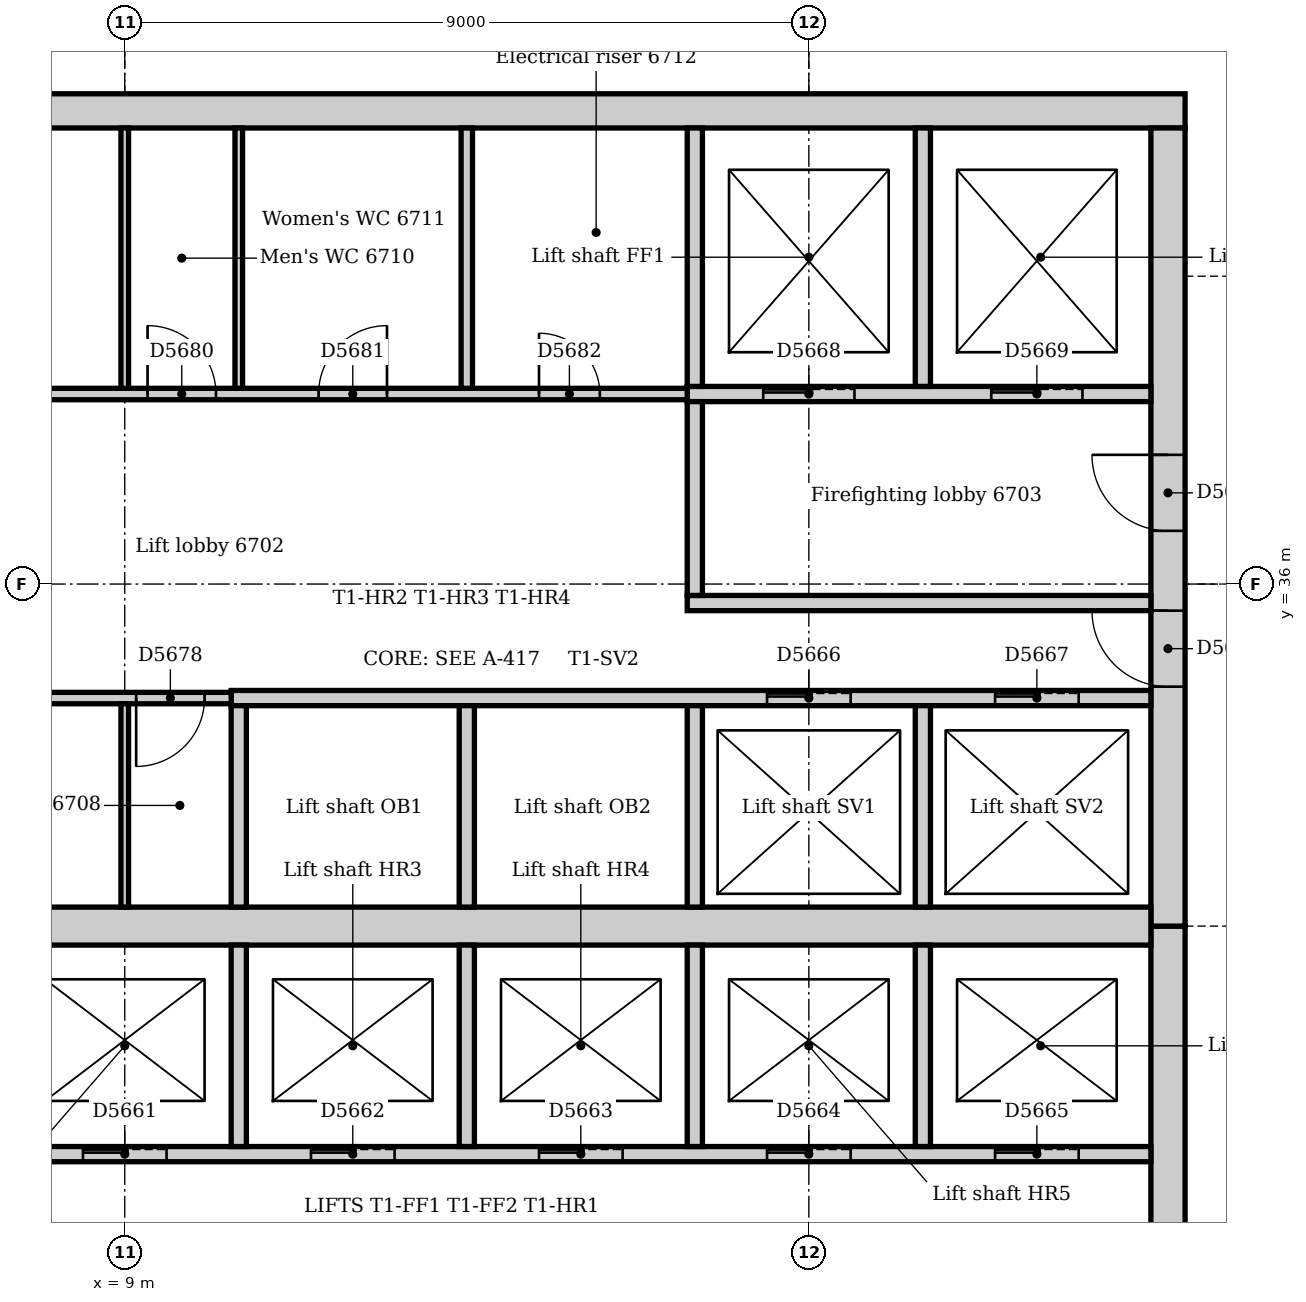
"""IFC4 building model, lengths in metres.
Left out: names, types, materials, properties, quantities, classifications, styles, units other than length and angle.
Written with IfcOpenShell. Run it as: python <this file> out.ifc"""

import sys

from ifc_helpers import new_model, si_unit, direction, frame, frame_2d, origin, place, context, subcontext, project, spatial, rectangle, extrude, element, fill, save


model = new_model("IFC4")
c1 = context("Model", 3, precision=1e-05, world=origin(), true_north=direction((0.0, 1.0)))
c2 = subcontext(c1, "Body", "Model", "MODEL_VIEW")
j1 = project(units=[si_unit("LENGTHUNIT", "METRE"), si_unit("PLANEANGLEUNIT", "RADIAN")], contexts=[c1])
p1 = place(None, origin())
s1 = spatial("IfcSite", under=j1, at=p1, CompositionType="ELEMENT")
p2 = place(p1, origin())
s2 = spatial("IfcBuilding", under=s1, at=p2, CompositionType="ELEMENT")
p3 = place(p2, frame((0.0, 0.0, 279.0)))
s3 = spatial("IfcBuildingStorey", under=s2, at=p3, CompositionType="ELEMENT", Elevation=279.0)
p4 = place(p3, frame((22.95, 42.225, 0.0), z_axis=(0.0, 0.0, 1.0), x_axis=(-1.0, 0.0, 0.0)))
e1 = element("IfcWall", 1, at=p4, inside=s3, PredefinedType="SOLIDWALL", context=c2, shape_type="SweptSolid", body=[
    extrude(rectangle(XDim=18.9, YDim=0.45, at=frame_2d((9.45, 0.0))), origin(), (0.0, 0.0, 1.0), 4.0),
])
p5 = place(p3, frame((22.725, 21.0, 0.0), z_axis=(0.0, 0.0, 1.0), x_axis=(0.0, 1.0, 0.0)))
e2 = element("IfcWall", 2, at=p5, inside=s3, PredefinedType="SOLIDWALL", context=c2, shape_type="SweptSolid", body=[
    extrude(rectangle(XDim=10.5, YDim=0.45, at=frame_2d((5.25, 0.0))), origin(), (0.0, 0.0, 1.0), 4.0),
])
p6 = place(p5, frame((4.35, 0.0, 0.0)))
e3 = element("IfcOpeningElement", 3, at=p6, cuts=e2, PredefinedType="OPENING", context=c2, shape_type="SweptSolid", body=[
    extrude(rectangle(XDim=1.8, YDim=2.1, at=frame_2d((0.9, 1.05))), frame((0.0, 0.235, 0.0), z_axis=(0.0, -1.0, 0.0), x_axis=(1.0, 0.0, 0.0)), (0.0, 0.0, 1.0), 0.47),
])
p7 = place(p3, frame((22.725, 31.5, 0.0), z_axis=(0.0, 0.0, 1.0), x_axis=(0.0, 1.0, 0.0)))
e4 = element("IfcWall", 4, at=p7, inside=s3, PredefinedType="SOLIDWALL", context=c2, shape_type="SweptSolid", body=[
    extrude(rectangle(XDim=10.5, YDim=0.45, at=frame_2d((5.25, 0.0))), origin(), (0.0, 0.0, 1.0), 4.0),
])
p8 = place(p7, frame((3.15, 0.0, 0.0)))
e5 = element("IfcOpeningElement", 5, at=p8, cuts=e4, PredefinedType="OPENING", context=c2, shape_type="SweptSolid", body=[
    extrude(rectangle(XDim=1.0, YDim=2.1, at=frame_2d((0.5, 1.05))), frame((0.0, 0.235, 0.0), z_axis=(0.0, -1.0, 0.0), x_axis=(1.0, 0.0, 0.0)), (0.0, 0.0, 1.0), 0.47),
])
p9 = place(p7, frame((5.2, 0.0, 0.0)))
e6 = element("IfcOpeningElement", 6, at=p9, cuts=e4, PredefinedType="OPENING", context=c2, shape_type="SweptSolid", body=[
    extrude(rectangle(XDim=1.0, YDim=2.1, at=frame_2d((0.5, 1.05))), frame((0.0, 0.235, 0.0), z_axis=(0.0, -1.0, 0.0), x_axis=(1.0, 0.0, 0.0)), (0.0, 0.0, 1.0), 0.47),
])
p10 = place(p3, frame((4.5, 31.5, 0.0), z_axis=(0.0, 0.0, 1.0), x_axis=(1.0, 0.0, 0.0)))
e7 = element("IfcWall", 7, at=p10, inside=s3, PredefinedType="SOLIDWALL", context=c2, shape_type="SweptSolid", body=[
    extrude(rectangle(XDim=18.0, YDim=0.5, at=frame_2d((9.0, 0.0))), origin(), (0.0, 0.0, 1.0), 4.0),
])
p11 = place(p3, frame((16.4, 35.75, 0.0), z_axis=(0.0, 0.0, 1.0), x_axis=(1.0, 0.0, 0.0)))
e8 = element("IfcWall", 8, at=p11, inside=s3, PredefinedType="PARTITIONING", context=c2, shape_type="SweptSolid", body=[
    extrude(rectangle(XDim=6.1, YDim=0.2, at=frame_2d((3.05, 0.0))), origin(), (0.0, 0.0, 1.0), 3.8),
])
p12 = place(p3, frame((16.4, 38.5, 0.0), z_axis=(0.0, 0.0, 1.0), x_axis=(1.0, 0.0, 0.0)))
e9 = element("IfcWall", 9, at=p12, inside=s3, PredefinedType="PARTITIONING", context=c2, shape_type="SweptSolid", body=[
    extrude(rectangle(XDim=6.1, YDim=0.2, at=frame_2d((3.05, 0.0))), origin(), (0.0, 0.0, 1.0), 3.8),
])
p13 = place(p12, frame((1.0, 0.0, 0.0)))
e10 = element("IfcOpeningElement", 10, at=p13, cuts=e9, PredefinedType="OPENING", context=c2, shape_type="SweptSolid", body=[
    extrude(rectangle(XDim=1.2, YDim=2.1, at=frame_2d((0.6, 1.05))), frame((0.0, 0.11, 0.0), z_axis=(0.0, -1.0, 0.0), x_axis=(1.0, 0.0, 0.0)), (0.0, 0.0, 1.0), 0.22),
])
p14 = place(p12, frame((4.0, 0.0, 0.0)))
e11 = element("IfcOpeningElement", 11, at=p14, cuts=e9, PredefinedType="OPENING", context=c2, shape_type="SweptSolid", body=[
    extrude(rectangle(XDim=1.2, YDim=2.1, at=frame_2d((0.6, 1.05))), frame((0.0, 0.11, 0.0), z_axis=(0.0, -1.0, 0.0), x_axis=(1.0, 0.0, 0.0)), (0.0, 0.0, 1.0), 0.22),
])
p15 = place(p3, frame((16.5, 35.85, 0.0), z_axis=(0.0, 0.0, 1.0), x_axis=(0.0, 1.0, 0.0)))
e12 = element("IfcWall", 12, at=p15, inside=s3, PredefinedType="PARTITIONING", context=c2, shape_type="SweptSolid", body=[
    extrude(rectangle(XDim=2.55, YDim=0.2, at=frame_2d((1.275, 0.0))), origin(), (0.0, 0.0, 1.0), 3.8),
])
p16 = place(p3, frame((4.5, 28.5, 0.0), z_axis=(0.0, 0.0, 1.0), x_axis=(1.0, 0.0, 0.0)))
e13 = element("IfcWall", 13, at=p16, inside=s3, PredefinedType="PARTITIONING", context=c2, shape_type="SweptSolid", body=[
    extrude(rectangle(XDim=18.0, YDim=0.2, at=frame_2d((9.0, 0.0))), origin(), (0.0, 0.0, 1.0), 3.8),
])
p17 = place(p16, frame((0.95, 0.0, 0.0)))
e14 = element("IfcOpeningElement", 14, at=p17, cuts=e13, PredefinedType="OPENING", context=c2, shape_type="SweptSolid", body=[
    extrude(rectangle(XDim=1.1, YDim=2.1, at=frame_2d((0.55, 1.05))), frame((0.0, 0.11, 0.0), z_axis=(0.0, -1.0, 0.0), x_axis=(1.0, 0.0, 0.0)), (0.0, 0.0, 1.0), 0.22),
])
p18 = place(p16, frame((3.95, 0.0, 0.0)))
e15 = element("IfcOpeningElement", 15, at=p18, cuts=e13, PredefinedType="OPENING", context=c2, shape_type="SweptSolid", body=[
    extrude(rectangle(XDim=1.1, YDim=2.1, at=frame_2d((0.55, 1.05))), frame((0.0, 0.11, 0.0), z_axis=(0.0, -1.0, 0.0), x_axis=(1.0, 0.0, 0.0)), (0.0, 0.0, 1.0), 0.22),
])
p19 = place(p16, frame((6.95, 0.0, 0.0)))
e16 = element("IfcOpeningElement", 16, at=p19, cuts=e13, PredefinedType="OPENING", context=c2, shape_type="SweptSolid", body=[
    extrude(rectangle(XDim=1.1, YDim=2.1, at=frame_2d((0.55, 1.05))), frame((0.0, 0.11, 0.0), z_axis=(0.0, -1.0, 0.0), x_axis=(1.0, 0.0, 0.0)), (0.0, 0.0, 1.0), 0.22),
])
p20 = place(p16, frame((9.95, 0.0, 0.0)))
e17 = element("IfcOpeningElement", 17, at=p20, cuts=e13, PredefinedType="OPENING", context=c2, shape_type="SweptSolid", body=[
    extrude(rectangle(XDim=1.1, YDim=2.1, at=frame_2d((0.55, 1.05))), frame((0.0, 0.11, 0.0), z_axis=(0.0, -1.0, 0.0), x_axis=(1.0, 0.0, 0.0)), (0.0, 0.0, 1.0), 0.22),
])
p21 = place(p16, frame((12.95, 0.0, 0.0)))
e18 = element("IfcOpeningElement", 18, at=p21, cuts=e13, PredefinedType="OPENING", context=c2, shape_type="SweptSolid", body=[
    extrude(rectangle(XDim=1.1, YDim=2.1, at=frame_2d((0.55, 1.05))), frame((0.0, 0.11, 0.0), z_axis=(0.0, -1.0, 0.0), x_axis=(1.0, 0.0, 0.0)), (0.0, 0.0, 1.0), 0.22),
])
p22 = place(p16, frame((15.95, 0.0, 0.0)))
e19 = element("IfcOpeningElement", 19, at=p22, cuts=e13, PredefinedType="OPENING", context=c2, shape_type="SweptSolid", body=[
    extrude(rectangle(XDim=1.1, YDim=2.1, at=frame_2d((0.55, 1.05))), frame((0.0, 0.11, 0.0), z_axis=(0.0, -1.0, 0.0), x_axis=(1.0, 0.0, 0.0)), (0.0, 0.0, 1.0), 0.22),
])
p23 = place(p3, frame((10.4, 34.5, 0.0), z_axis=(0.0, 0.0, 1.0), x_axis=(1.0, 0.0, 0.0)))
e20 = element("IfcWall", 20, at=p23, inside=s3, PredefinedType="PARTITIONING", context=c2, shape_type="SweptSolid", body=[
    extrude(rectangle(XDim=12.1, YDim=0.2, at=frame_2d((6.05, 0.0))), origin(), (0.0, 0.0, 1.0), 3.8),
])
p24 = place(p23, frame((7.05, 0.0, 0.0)))
e21 = element("IfcOpeningElement", 21, at=p24, cuts=e20, PredefinedType="OPENING", context=c2, shape_type="SweptSolid", body=[
    extrude(rectangle(XDim=1.1, YDim=2.1, at=frame_2d((0.55, 1.05))), frame((0.0, 0.11, 0.0), z_axis=(0.0, -1.0, 0.0), x_axis=(1.0, 0.0, 0.0)), (0.0, 0.0, 1.0), 0.22),
])
p25 = place(p23, frame((10.05, 0.0, 0.0)))
e22 = element("IfcOpeningElement", 22, at=p25, cuts=e20, PredefinedType="OPENING", context=c2, shape_type="SweptSolid", body=[
    extrude(rectangle(XDim=1.1, YDim=2.1, at=frame_2d((0.55, 1.05))), frame((0.0, 0.11, 0.0), z_axis=(0.0, -1.0, 0.0), x_axis=(1.0, 0.0, 0.0)), (0.0, 0.0, 1.0), 0.22),
])
for number, where, z_axis, x_axis in (
    (23, (10.5, 28.6, 0.0), (0.0, 0.0, 1.0), (0.0, 1.0, 0.0)),
    (24, (10.5, 31.75, 0.0), (0.0, 0.0, 1.0), (0.0, 1.0, 0.0)),
    (25, (13.5, 28.6, 0.0), (0.0, 0.0, 1.0), (0.0, 1.0, 0.0)),
    (26, (13.5, 31.75, 0.0), (0.0, 0.0, 1.0), (0.0, 1.0, 0.0)),
    (27, (16.5, 28.6, 0.0), (0.0, 0.0, 1.0), (0.0, 1.0, 0.0)),
    (28, (16.5, 31.75, 0.0), (0.0, 0.0, 1.0), (0.0, 1.0, 0.0)),
    (29, (19.5, 28.6, 0.0), (0.0, 0.0, 1.0), (0.0, 1.0, 0.0)),
    (30, (19.5, 31.75, 0.0), (0.0, 0.0, 1.0), (0.0, 1.0, 0.0)),
):
    element("IfcWall", number, at=place(p3, frame(where, z_axis=z_axis, x_axis=x_axis)), inside=s3, PredefinedType="PARTITIONING", context=c2, shape_type="SweptSolid", body=[
        extrude(rectangle(XDim=2.65, YDim=0.2, at=frame_2d((1.325, 0.0))), origin(), (0.0, 0.0, 1.0), 3.8),
    ])
for number, where, z_axis, x_axis in (
    (31, (16.5, 38.6, 0.0), (0.0, 0.0, 1.0), (0.0, 1.0, 0.0)),
    (32, (19.5, 38.6, 0.0), (0.0, 0.0, 1.0), (0.0, 1.0, 0.0)),
):
    element("IfcWall", number, at=place(p3, frame(where, z_axis=z_axis, x_axis=x_axis)), inside=s3, PredefinedType="PARTITIONING", context=c2, shape_type="SweptSolid", body=[
        extrude(rectangle(XDim=3.4, YDim=0.2, at=frame_2d((1.7, 0.0))), origin(), (0.0, 0.0, 1.0), 3.8),
    ])
p26 = place(p3, frame((4.5, 38.5, 0.0), z_axis=(0.0, 0.0, 1.0), x_axis=(1.0, 0.0, 0.0)))
e33 = element("IfcWall", 33, at=p26, inside=s3, PredefinedType="PARTITIONING", context=c2, shape_type="SweptSolid", body=[
    extrude(rectangle(XDim=11.9, YDim=0.15, at=frame_2d((5.95, 0.0))), origin(), (0.0, 0.0, 1.0), 3.8),
])
p27 = place(p26, frame((1.85, 0.0, 0.0)))
e34 = element("IfcOpeningElement", 34, at=p27, cuts=e33, PredefinedType="OPENING", context=c2, shape_type="SweptSolid", body=[
    extrude(rectangle(XDim=0.9, YDim=2.1, at=frame_2d((0.45, 1.05))), frame((0.0, 0.085, 0.0), z_axis=(0.0, -1.0, 0.0), x_axis=(1.0, 0.0, 0.0)), (0.0, 0.0, 1.0), 0.17),
])
p28 = place(p26, frame((4.8, 0.0, 0.0)))
e35 = element("IfcOpeningElement", 35, at=p28, cuts=e33, PredefinedType="OPENING", context=c2, shape_type="SweptSolid", body=[
    extrude(rectangle(XDim=0.9, YDim=2.1, at=frame_2d((0.45, 1.05))), frame((0.0, 0.085, 0.0), z_axis=(0.0, -1.0, 0.0), x_axis=(1.0, 0.0, 0.0)), (0.0, 0.0, 1.0), 0.17),
])
p29 = place(p26, frame((7.05, 0.0, 0.0)))
e36 = element("IfcOpeningElement", 36, at=p29, cuts=e33, PredefinedType="OPENING", context=c2, shape_type="SweptSolid", body=[
    extrude(rectangle(XDim=0.9, YDim=2.1, at=frame_2d((0.45, 1.05))), frame((0.0, 0.085, 0.0), z_axis=(0.0, -1.0, 0.0), x_axis=(1.0, 0.0, 0.0)), (0.0, 0.0, 1.0), 0.17),
])
p30 = place(p26, frame((9.95, 0.0, 0.0)))
e37 = element("IfcOpeningElement", 37, at=p30, cuts=e33, PredefinedType="OPENING", context=c2, shape_type="SweptSolid", body=[
    extrude(rectangle(XDim=0.8, YDim=2.1, at=frame_2d((0.4, 1.05))), frame((0.0, 0.085, 0.0), z_axis=(0.0, -1.0, 0.0), x_axis=(1.0, 0.0, 0.0)), (0.0, 0.0, 1.0), 0.17),
])
p31 = place(p3, frame((4.5, 34.5, 0.0), z_axis=(0.0, 0.0, 1.0), x_axis=(1.0, 0.0, 0.0)))
e38 = element("IfcWall", 38, at=p31, inside=s3, PredefinedType="PARTITIONING", context=c2, shape_type="SweptSolid", body=[
    extrude(rectangle(XDim=5.9, YDim=0.15, at=frame_2d((2.95, 0.0))), origin(), (0.0, 0.0, 1.0), 3.8),
])
p32 = place(p31, frame((1.85, 0.0, 0.0)))
e39 = element("IfcOpeningElement", 39, at=p32, cuts=e38, PredefinedType="OPENING", context=c2, shape_type="SweptSolid", body=[
    extrude(rectangle(XDim=0.9, YDim=2.1, at=frame_2d((0.45, 1.05))), frame((0.0, 0.085, 0.0), z_axis=(0.0, -1.0, 0.0), x_axis=(1.0, 0.0, 0.0)), (0.0, 0.0, 1.0), 0.17),
])
p33 = place(p31, frame((4.65, 0.0, 0.0)))
e40 = element("IfcOpeningElement", 40, at=p33, cuts=e38, PredefinedType="OPENING", context=c2, shape_type="SweptSolid", body=[
    extrude(rectangle(XDim=0.9, YDim=2.1, at=frame_2d((0.45, 1.05))), frame((0.0, 0.085, 0.0), z_axis=(0.0, -1.0, 0.0), x_axis=(1.0, 0.0, 0.0)), (0.0, 0.0, 1.0), 0.17),
])
p34 = place(p3, frame((13.5, 38.575, 0.0), z_axis=(0.0, 0.0, 1.0), x_axis=(0.0, 1.0, 0.0)))
e41 = element("IfcWall", 41, at=p34, inside=s3, PredefinedType="PARTITIONING", context=c2, shape_type="SweptSolid", body=[
    extrude(rectangle(XDim=3.425, YDim=0.15, at=frame_2d((1.712, 0.0))), origin(), (0.0, 0.0, 1.0), 3.8),
])
for number, where, z_axis, x_axis in (
    (42, (9.0, 38.575, 0.0), (0.0, 0.0, 1.0), (0.0, 1.0, 0.0)),
    (43, (10.5, 38.575, 0.0), (0.0, 0.0, 1.0), (0.0, 1.0, 0.0)),
):
    element("IfcWall", number, at=place(p3, frame(where, z_axis=z_axis, x_axis=x_axis)), inside=s3, PredefinedType="PARTITIONING", context=c2, shape_type="SweptSolid", body=[
        extrude(rectangle(XDim=3.425, YDim=0.1, at=frame_2d((1.712, 0.0))), origin(), (0.0, 0.0, 1.0), 3.8),
    ])
p35 = place(p3, frame((9.0, 31.75, 0.0), z_axis=(0.0, 0.0, 1.0), x_axis=(0.0, 1.0, 0.0)))
e44 = element("IfcWall", 44, at=p35, inside=s3, PredefinedType="PARTITIONING", context=c2, shape_type="SweptSolid", body=[
    extrude(rectangle(XDim=2.675, YDim=0.1, at=frame_2d((1.337, 0.0))), origin(), (0.0, 0.0, 1.0), 3.8),
])
p36 = place(p18, origin())
e45 = element("IfcDoor", 45, at=p36, inside=s3, OperationType="SLIDING_TO_LEFT", PredefinedType="DOOR", context=c2, shape_type="SweptSolid", body=[
    extrude(rectangle(XDim=1.1, YDim=2.1, at=frame_2d((0.55, 1.05))), frame((0.0, 0.025, 0.0), z_axis=(0.0, -1.0, 0.0), x_axis=(1.0, 0.0, 0.0)), (0.0, 0.0, 1.0), 0.05),
])
fill(e15, e45)
p37 = place(p19, origin())
e46 = element("IfcDoor", 46, at=p37, inside=s3, OperationType="SLIDING_TO_LEFT", PredefinedType="DOOR", context=c2, shape_type="SweptSolid", body=[
    extrude(rectangle(XDim=1.1, YDim=2.1, at=frame_2d((0.55, 1.05))), frame((0.0, 0.025, 0.0), z_axis=(0.0, -1.0, 0.0), x_axis=(1.0, 0.0, 0.0)), (0.0, 0.0, 1.0), 0.05),
])
fill(e16, e46)
p38 = place(p20, origin())
e47 = element("IfcDoor", 47, at=p38, inside=s3, OperationType="SLIDING_TO_LEFT", PredefinedType="DOOR", context=c2, shape_type="SweptSolid", body=[
    extrude(rectangle(XDim=1.1, YDim=2.1, at=frame_2d((0.55, 1.05))), frame((0.0, 0.025, 0.0), z_axis=(0.0, -1.0, 0.0), x_axis=(1.0, 0.0, 0.0)), (0.0, 0.0, 1.0), 0.05),
])
fill(e17, e47)
p39 = place(p21, origin())
e48 = element("IfcDoor", 48, at=p39, inside=s3, OperationType="SLIDING_TO_LEFT", PredefinedType="DOOR", context=c2, shape_type="SweptSolid", body=[
    extrude(rectangle(XDim=1.1, YDim=2.1, at=frame_2d((0.55, 1.05))), frame((0.0, 0.025, 0.0), z_axis=(0.0, -1.0, 0.0), x_axis=(1.0, 0.0, 0.0)), (0.0, 0.0, 1.0), 0.05),
])
fill(e18, e48)
p40 = place(p22, origin())
e49 = element("IfcDoor", 49, at=p40, inside=s3, OperationType="SLIDING_TO_LEFT", PredefinedType="DOOR", context=c2, shape_type="SweptSolid", body=[
    extrude(rectangle(XDim=1.1, YDim=2.1, at=frame_2d((0.55, 1.05))), frame((0.0, 0.025, 0.0), z_axis=(0.0, -1.0, 0.0), x_axis=(1.0, 0.0, 0.0)), (0.0, 0.0, 1.0), 0.05),
])
fill(e19, e49)
p41 = place(p24, origin())
e50 = element("IfcDoor", 50, at=p41, inside=s3, OperationType="SLIDING_TO_LEFT", PredefinedType="DOOR", context=c2, shape_type="SweptSolid", body=[
    extrude(rectangle(XDim=1.1, YDim=2.1, at=frame_2d((0.55, 1.05))), frame((0.0, 0.025, 0.0), z_axis=(0.0, -1.0, 0.0), x_axis=(1.0, 0.0, 0.0)), (0.0, 0.0, 1.0), 0.05),
])
fill(e21, e50)
p42 = place(p25, origin())
e51 = element("IfcDoor", 51, at=p42, inside=s3, OperationType="SLIDING_TO_LEFT", PredefinedType="DOOR", context=c2, shape_type="SweptSolid", body=[
    extrude(rectangle(XDim=1.1, YDim=2.1, at=frame_2d((0.55, 1.05))), frame((0.0, 0.025, 0.0), z_axis=(0.0, -1.0, 0.0), x_axis=(1.0, 0.0, 0.0)), (0.0, 0.0, 1.0), 0.05),
])
fill(e22, e51)
p43 = place(p13, origin())
e52 = element("IfcDoor", 52, at=p43, inside=s3, OperationType="SLIDING_TO_LEFT", PredefinedType="DOOR", context=c2, shape_type="SweptSolid", body=[
    extrude(rectangle(XDim=1.2, YDim=2.1, at=frame_2d((0.6, 1.05))), frame((0.0, 0.025, 0.0), z_axis=(0.0, -1.0, 0.0), x_axis=(1.0, 0.0, 0.0)), (0.0, 0.0, 1.0), 0.05),
])
fill(e10, e52)
p44 = place(p14, origin())
e53 = element("IfcDoor", 53, at=p44, inside=s3, OperationType="SLIDING_TO_LEFT", PredefinedType="DOOR", context=c2, shape_type="SweptSolid", body=[
    extrude(rectangle(XDim=1.2, YDim=2.1, at=frame_2d((0.6, 1.05))), frame((0.0, 0.025, 0.0), z_axis=(0.0, -1.0, 0.0), x_axis=(1.0, 0.0, 0.0)), (0.0, 0.0, 1.0), 0.05),
])
fill(e11, e53)
p45 = place(p8, origin())
e54 = element("IfcDoor", 54, at=p45, inside=s3, OperationType="SINGLE_SWING_RIGHT", PredefinedType="DOOR", context=c2, shape_type="SweptSolid", body=[
    extrude(rectangle(XDim=1.0, YDim=2.1, at=frame_2d((0.5, 1.05))), frame((0.0, 0.025, 0.0), z_axis=(0.0, -1.0, 0.0), x_axis=(1.0, 0.0, 0.0)), (0.0, 0.0, 1.0), 0.05),
])
fill(e5, e54)
p46 = place(p9, origin())
e55 = element("IfcDoor", 55, at=p46, inside=s3, OperationType="SINGLE_SWING_RIGHT", PredefinedType="DOOR", context=c2, shape_type="SweptSolid", body=[
    extrude(rectangle(XDim=1.0, YDim=2.1, at=frame_2d((0.5, 1.05))), frame((0.0, 0.025, 0.0), z_axis=(0.0, -1.0, 0.0), x_axis=(1.0, 0.0, 0.0)), (0.0, 0.0, 1.0), 0.05),
])
fill(e6, e55)
p47 = place(p33, frame((0.9, 0.0, 0.0), z_axis=(0.0, 0.0, 1.0), x_axis=(-1.0, 0.0, 0.0)))
e56 = element("IfcDoor", 56, at=p47, inside=s3, OperationType="SINGLE_SWING_RIGHT", PredefinedType="DOOR", context=c2, shape_type="SweptSolid", body=[
    extrude(rectangle(XDim=0.9, YDim=2.1, at=frame_2d((0.45, 1.05))), frame((0.0, 0.025, 0.0), z_axis=(0.0, -1.0, 0.0), x_axis=(1.0, 0.0, 0.0)), (0.0, 0.0, 1.0), 0.05),
])
fill(e40, e56)
p48 = place(p28, origin())
e57 = element("IfcDoor", 57, at=p48, inside=s3, OperationType="SINGLE_SWING_LEFT", PredefinedType="DOOR", context=c2, shape_type="SweptSolid", body=[
    extrude(rectangle(XDim=0.9, YDim=2.1, at=frame_2d((0.45, 1.05))), frame((0.0, 0.025, 0.0), z_axis=(0.0, -1.0, 0.0), x_axis=(1.0, 0.0, 0.0)), (0.0, 0.0, 1.0), 0.05),
])
fill(e35, e57)
p49 = place(p29, origin())
e58 = element("IfcDoor", 58, at=p49, inside=s3, OperationType="SINGLE_SWING_RIGHT", PredefinedType="DOOR", context=c2, shape_type="SweptSolid", body=[
    extrude(rectangle(XDim=0.9, YDim=2.1, at=frame_2d((0.45, 1.05))), frame((0.0, 0.025, 0.0), z_axis=(0.0, -1.0, 0.0), x_axis=(1.0, 0.0, 0.0)), (0.0, 0.0, 1.0), 0.05),
])
fill(e36, e58)
p50 = place(p30, origin())
e59 = element("IfcDoor", 59, at=p50, inside=s3, OperationType="SINGLE_SWING_LEFT", PredefinedType="DOOR", context=c2, shape_type="SweptSolid", body=[
    extrude(rectangle(XDim=0.8, YDim=2.1, at=frame_2d((0.4, 1.05))), frame((0.0, 0.025, 0.0), z_axis=(0.0, -1.0, 0.0), x_axis=(1.0, 0.0, 0.0)), (0.0, 0.0, 1.0), 0.05),
])
fill(e37, e59)
save(model, sys.argv[1])
